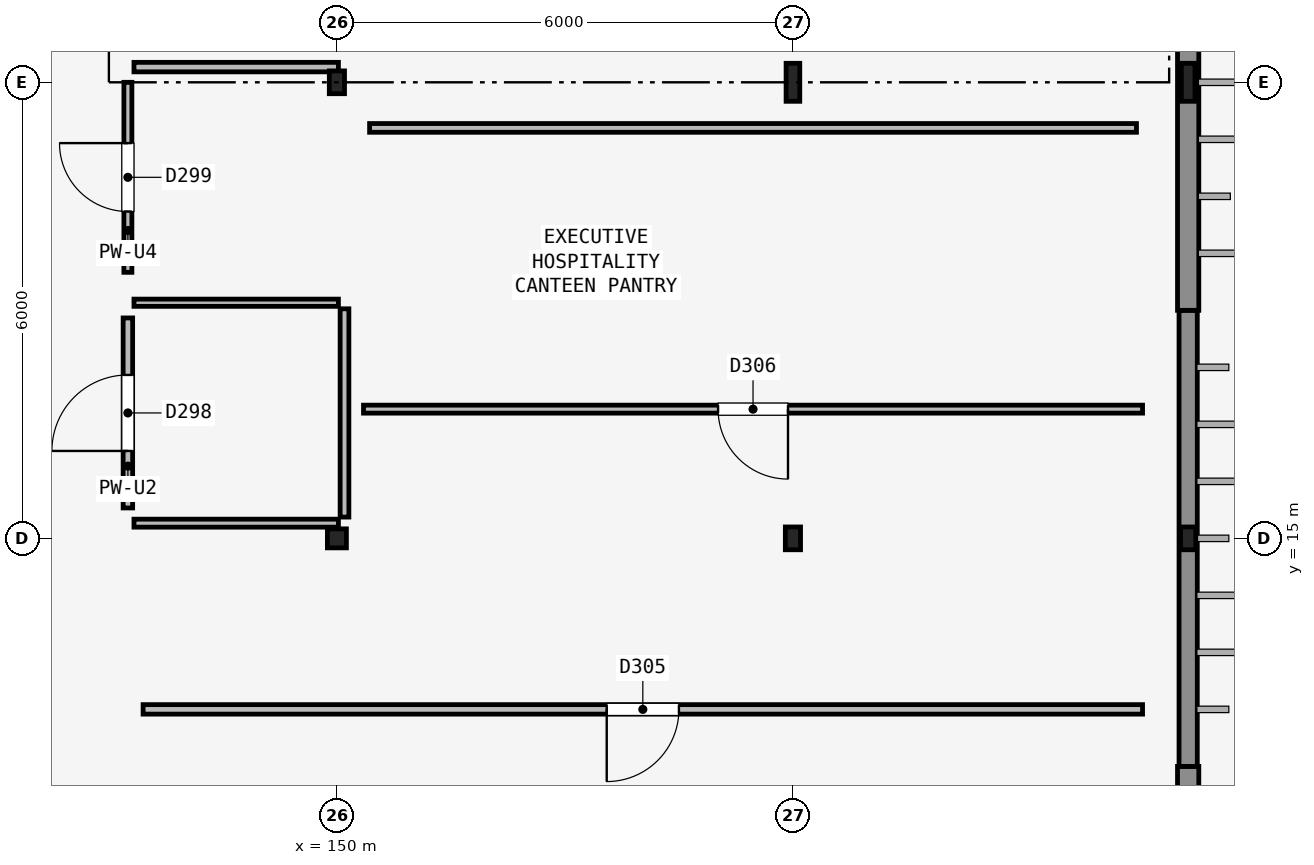
"""IFC4 building model, lengths in metres.
Left out: names, types, materials, properties, quantities, classifications, styles, units other than length and angle.
Written with IfcOpenShell. Run it as: python <this file> out.ifc"""

import sys

from ifc_helpers import new_model, si_unit, direction, frame, frame_2d, origin, origin_2d, place, context, subcontext, project, spatial, rectangle, hollow_rectangle, i_section, extrude, element, fill, save


model = new_model("IFC4")
c1 = context("Model", 3, precision=1e-05, world=origin(), true_north=direction((0.0, 1.0)))
c2 = subcontext(c1, "Body", "Model", "MODEL_VIEW")
j1 = project(units=[si_unit("LENGTHUNIT", "METRE"), si_unit("PLANEANGLEUNIT", "RADIAN")], contexts=[c1])
p1 = place(None, origin())
s1 = spatial("IfcSite", under=j1, at=p1, CompositionType="ELEMENT")
p2 = place(p1, origin())
s2 = spatial("IfcBuilding", under=s1, at=p2, CompositionType="ELEMENT")
p3 = place(p2, frame((0.0, 0.0, 30.0)))
s3 = spatial("IfcBuildingStorey", under=s2, at=p3, CompositionType="ELEMENT", Elevation=30.0)
p4 = place(p3, frame((150.0, 15.0, 0.0), z_axis=(0.0, 0.0, 1.0), x_axis=(1.0, 0.0, 0.0)))
e1 = element("IfcColumn", 1, at=p4, inside=s3, PredefinedType="COLUMN", context=c2, shape_type="SweptSolid", body=[
    extrude(hollow_rectangle(XDim=0.25, YDim=0.25, WallThickness=0.012, InnerFilletRadius=0.012, OuterFilletRadius=0.024, at=origin_2d()), origin(), (0.0, 0.0, 1.0), 4.2),
])
for number, where, z_axis, x_axis in (
    (2, (150.0, 21.0, 0.0), (0.0, 0.0, 1.0), (1.0, 0.0, 0.0)),
    (3, (156.0, 15.0, 0.0), (0.0, 0.0, 1.0), (1.0, 0.0, 0.0)),
):
    element("IfcColumn", number, at=place(p3, frame(where, z_axis=z_axis, x_axis=x_axis)), inside=s3, PredefinedType="COLUMN", context=c2, shape_type="SweptSolid", body=[
        extrude(hollow_rectangle(XDim=0.2, YDim=0.3, WallThickness=0.012, InnerFilletRadius=0.012, OuterFilletRadius=0.024, at=origin_2d()), origin(), (0.0, 0.0, 1.0), 4.2),
    ])
p5 = place(p3, frame((156.0, 21.0, 0.0), z_axis=(0.0, 0.0, 1.0), x_axis=(1.0, 0.0, 0.0)))
e4 = element("IfcColumn", 4, at=p5, inside=s3, PredefinedType="COLUMN", context=c2, shape_type="SweptSolid", body=[
    extrude(i_section(OverallWidth=0.18, OverallDepth=0.5, WebThickness=0.01, FlangeThickness=0.017, FilletRadius=0.017, at=origin_2d()), origin(), (0.0, 0.0, 1.0), 4.2),
])
p6 = place(p3, frame((161.2, 15.0, 0.0), z_axis=(0.0, 0.0, 1.0), x_axis=(1.0, 0.0, 0.0)))
e5 = element("IfcColumn", 5, at=p6, inside=s3, PredefinedType="COLUMN", context=c2, shape_type="SweptSolid", body=[
    extrude(hollow_rectangle(XDim=0.2, YDim=0.3, WallThickness=0.012, InnerFilletRadius=0.012, OuterFilletRadius=0.024, at=origin_2d()), origin(), (0.0, 0.0, 1.0), 4.2),
])
p7 = place(p3, frame((161.2, 21.0, 0.0), z_axis=(0.0, 0.0, 1.0), x_axis=(1.0, 0.0, 0.0)))
e6 = element("IfcColumn", 6, at=p7, inside=s3, PredefinedType="COLUMN", context=c2, shape_type="SweptSolid", body=[
    extrude(i_section(OverallWidth=0.18, OverallDepth=0.5, WebThickness=0.01, FlangeThickness=0.017, FilletRadius=0.017, at=origin_2d()), origin(), (0.0, 0.0, 1.0), 4.2),
])
p8 = place(p3, frame((161.2, 6.0, 0.0), z_axis=(0.0, 0.0, 1.0), x_axis=(0.0, 1.0, 0.0)))
e7 = element("IfcWall", 7, at=p8, inside=s3, PredefinedType="SOLIDWALL", context=c2, shape_type="SweptSolid", body=[
    extrude(rectangle(XDim=6.0, YDim=0.28, at=frame_2d((3.0, 0.0))), origin(), (0.0, 0.0, 1.0), 3.58),
])
p9 = place(p3, frame((161.2, 12.0, 0.0), z_axis=(0.0, 0.0, 1.0), x_axis=(0.0, 1.0, 0.0)))
e8 = element("IfcWall", 8, at=p9, inside=s3, PredefinedType="SOLIDWALL", context=c2, shape_type="SweptSolid", body=[
    extrude(rectangle(XDim=6.0, YDim=0.24, at=frame_2d((3.0, 0.0))), origin(), (0.0, 0.0, 1.0), 3.53),
])
p10 = place(p3, frame((161.2, 18.0, 0.0), z_axis=(0.0, 0.0, 1.0), x_axis=(0.0, 1.0, 0.0)))
e9 = element("IfcWall", 9, at=p10, inside=s3, PredefinedType="SOLIDWALL", context=c2, shape_type="SweptSolid", body=[
    extrude(rectangle(XDim=6.0, YDim=0.28, at=frame_2d((3.0, 0.0))), origin(), (0.0, 0.0, 1.0), 3.53),
])
p11 = place(p3, frame((147.25, 15.4, 0.0), z_axis=(0.0, 0.0, 1.0), x_axis=(0.0, 1.0, 0.0)))
e10 = element("IfcWall", 10, at=p11, inside=s3, PredefinedType="PARTITIONING", context=c2, shape_type="SweptSolid", body=[
    extrude(rectangle(XDim=2.5, YDim=0.125, at=frame_2d((1.25, 0.0))), origin(), (0.0, 0.0, 1.0), 4.03),
])
p12 = place(p11, frame((0.75, 0.0, 0.0)))
e11 = element("IfcOpeningElement", 11, at=p12, cuts=e10, PredefinedType="OPENING", context=c2, shape_type="SweptSolid", body=[
    extrude(rectangle(XDim=1.0, YDim=2.1, at=frame_2d((0.5, 1.05))), frame((0.0, 0.073, 0.0), z_axis=(0.0, -1.0, 0.0), x_axis=(1.0, 0.0, 0.0)), (0.0, 0.0, 1.0), 0.145),
])
p13 = place(p3, frame((147.25, 18.5, 0.0), z_axis=(0.0, 0.0, 1.0), x_axis=(0.0, 1.0, 0.0)))
e12 = element("IfcWall", 12, at=p13, inside=s3, PredefinedType="PARTITIONING", context=c2, shape_type="SweptSolid", body=[
    extrude(rectangle(XDim=2.5, YDim=0.105, at=frame_2d((1.25, 0.0))), origin(), (0.0, 0.0, 1.0), 3.43),
])
p14 = place(p13, frame((0.8, 0.0, 0.0)))
e13 = element("IfcOpeningElement", 13, at=p14, cuts=e12, PredefinedType="OPENING", context=c2, shape_type="SweptSolid", body=[
    extrude(rectangle(XDim=0.9, YDim=2.1, at=frame_2d((0.45, 1.05))), frame((0.0, 0.062, 0.0), z_axis=(0.0, -1.0, 0.0), x_axis=(1.0, 0.0, 0.0)), (0.0, 0.0, 1.0), 0.125),
])
p15 = place(p3, frame((160.6, 12.75, 0.0), z_axis=(0.0, 0.0, 1.0), x_axis=(-1.0, 0.0, 0.0)))
e14 = element("IfcWall", 14, at=p15, inside=s3, PredefinedType="PARTITIONING", context=c2, shape_type="SweptSolid", body=[
    extrude(rectangle(XDim=13.15, YDim=0.125, at=frame_2d((6.575, 0.0))), origin(), (0.0, 0.0, 1.0), 3.68),
])
p16 = place(p15, frame((6.1, 0.0, 0.0)))
e15 = element("IfcOpeningElement", 15, at=p16, cuts=e14, PredefinedType="OPENING", context=c2, shape_type="SweptSolid", body=[
    extrude(rectangle(XDim=0.95, YDim=2.15, at=frame_2d((0.475, 1.075))), frame((0.0, 0.073, 0.0), z_axis=(0.0, -1.0, 0.0), x_axis=(1.0, 0.0, 0.0)), (0.0, 0.0, 1.0), 0.145),
])
p17 = place(p3, frame((160.6, 16.7, 0.0), z_axis=(0.0, 0.0, 1.0), x_axis=(-1.0, 0.0, 0.0)))
e16 = element("IfcWall", 16, at=p17, inside=s3, PredefinedType="PARTITIONING", context=c2, shape_type="SweptSolid", body=[
    extrude(rectangle(XDim=10.25, YDim=0.105, at=frame_2d((5.125, 0.0))), origin(), (0.0, 0.0, 1.0), 3.53),
])
p18 = place(p17, frame((4.665, 0.0, 0.0)))
e17 = element("IfcOpeningElement", 17, at=p18, cuts=e16, PredefinedType="OPENING", context=c2, shape_type="SweptSolid", body=[
    extrude(rectangle(XDim=0.92, YDim=2.1, at=frame_2d((0.46, 1.05))), frame((0.0, 0.062, 0.0), z_axis=(0.0, -1.0, 0.0), x_axis=(1.0, 0.0, 0.0)), (0.0, 0.0, 1.0), 0.125),
])
p19 = place(p3, frame((150.1, 18.02, 0.0), z_axis=(0.0, 0.0, 1.0), x_axis=(0.0, -1.0, 0.0)))
e18 = element("IfcWall", 18, at=p19, inside=s3, PredefinedType="PARTITIONING", context=c2, shape_type="SweptSolid", body=[
    extrude(rectangle(XDim=2.74, YDim=0.115, at=frame_2d((1.37, 0.0))), origin(), (0.0, 0.0, 1.0), 3.53),
])
p20 = place(p3, frame((150.02, 15.2, 0.0), z_axis=(0.0, 0.0, 1.0), x_axis=(-1.0, 0.0, 0.0)))
e19 = element("IfcWall", 19, at=p20, inside=s3, PredefinedType="PARTITIONING", context=c2, shape_type="SweptSolid", body=[
    extrude(rectangle(XDim=2.69, YDim=0.105, at=frame_2d((1.345, 0.0))), origin(), (0.0, 0.0, 1.0), 3.43),
])
p21 = place(p3, frame((147.33, 18.1, 0.0), z_axis=(0.0, 0.0, 1.0), x_axis=(1.0, 0.0, 0.0)))
e20 = element("IfcWall", 20, at=p21, inside=s3, PredefinedType="PARTITIONING", context=c2, shape_type="SweptSolid", body=[
    extrude(rectangle(XDim=2.69, YDim=0.095, at=frame_2d((1.345, 0.0))), origin(), (0.0, 0.0, 1.0), 3.53),
])
p22 = place(p3, frame((147.33, 21.2, 0.0), z_axis=(0.0, 0.0, 1.0), x_axis=(1.0, 0.0, 0.0)))
e21 = element("IfcWall", 21, at=p22, inside=s3, PredefinedType="PARTITIONING", context=c2, shape_type="SweptSolid", body=[
    extrude(rectangle(XDim=2.69, YDim=0.125, at=frame_2d((1.345, 0.0))), origin(), (0.0, 0.0, 1.0), 3.43),
])
p23 = place(p3, frame((150.43, 20.4, 0.0), z_axis=(0.0, 0.0, 1.0), x_axis=(1.0, 0.0, 0.0)))
e22 = element("IfcWall", 22, at=p23, inside=s3, PredefinedType="PARTITIONING", context=c2, shape_type="SweptSolid", body=[
    extrude(rectangle(XDim=10.09, YDim=0.115, at=frame_2d((5.045, 0.0))), origin(), (0.0, 0.0, 1.0), 3.53),
])
p24 = place(p12, origin())
e23 = element("IfcDoor", 23, at=p24, inside=s3, OperationType="SINGLE_SWING_LEFT", PredefinedType="DOOR", context=c2, shape_type="SweptSolid", body=[
    extrude(rectangle(XDim=1.0, YDim=2.1, at=frame_2d((0.5, 1.05))), frame((0.0, 0.025, 0.0), z_axis=(0.0, -1.0, 0.0), x_axis=(1.0, 0.0, 0.0)), (0.0, 0.0, 1.0), 0.05),
])
fill(e11, e23)
p25 = place(p14, origin())
e24 = element("IfcDoor", 24, at=p25, inside=s3, OperationType="SINGLE_SWING_RIGHT", PredefinedType="DOOR", context=c2, shape_type="SweptSolid", body=[
    extrude(rectangle(XDim=0.9, YDim=2.1, at=frame_2d((0.45, 1.05))), frame((0.0, 0.025, 0.0), z_axis=(0.0, -1.0, 0.0), x_axis=(1.0, 0.0, 0.0)), (0.0, 0.0, 1.0), 0.05),
])
fill(e13, e24)
p26 = place(p16, origin())
e25 = element("IfcDoor", 25, at=p26, inside=s3, OperationType="SINGLE_SWING_RIGHT", PredefinedType="DOOR", context=c2, shape_type="SweptSolid", body=[
    extrude(rectangle(XDim=0.95, YDim=2.15, at=frame_2d((0.475, 1.075))), frame((0.0, 0.025, 0.0), z_axis=(0.0, -1.0, 0.0), x_axis=(1.0, 0.0, 0.0)), (0.0, 0.0, 1.0), 0.05),
])
fill(e15, e25)
p27 = place(p18, origin())
e26 = element("IfcDoor", 26, at=p27, inside=s3, OperationType="SINGLE_SWING_LEFT", PredefinedType="DOOR", context=c2, shape_type="SweptSolid", body=[
    extrude(rectangle(XDim=0.92, YDim=2.1, at=frame_2d((0.46, 1.05))), frame((0.0, 0.025, 0.0), z_axis=(0.0, -1.0, 0.0), x_axis=(1.0, 0.0, 0.0)), (0.0, 0.0, 1.0), 0.05),
])
fill(e17, e26)
save(model, sys.argv[1])
